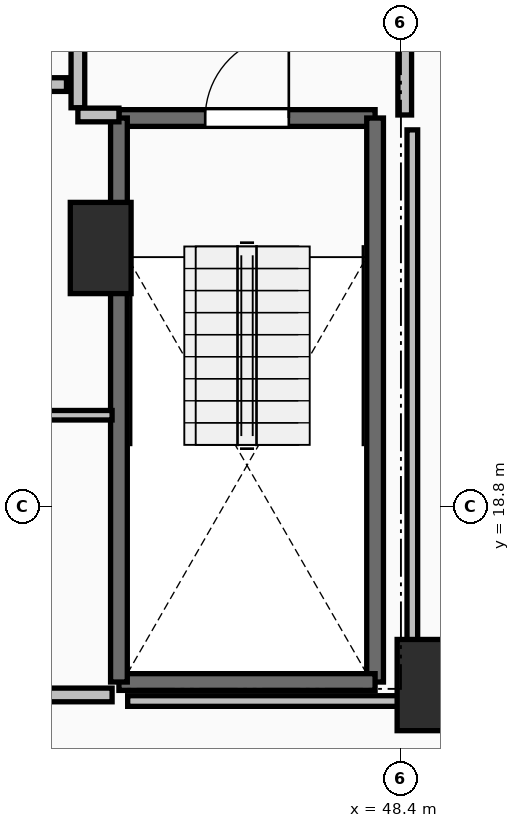
"""IFC4 building model, lengths in metres.
Left out: names, types, materials, properties, quantities, classifications, styles, units other than length and angle.
Written with IfcOpenShell. Run it as: python <this file> out.ifc"""

import sys

from ifc_helpers import new_model, si_unit, direction, frame, frame_2d, origin, origin_2d, place, context, subcontext, project, spatial, rectangle, extrude, element, fill, save


model = new_model("IFC4")
c1 = context("Model", 3, precision=1e-05, world=origin(), true_north=direction((0.0, 1.0)))
c2 = subcontext(c1, "Body", "Model", "MODEL_VIEW")
j1 = project(units=[si_unit("LENGTHUNIT", "METRE"), si_unit("PLANEANGLEUNIT", "RADIAN")], contexts=[c1])
p1 = place(None, origin())
s1 = spatial("IfcSite", under=j1, at=p1, CompositionType="ELEMENT")
p2 = place(p1, origin())
s2 = spatial("IfcBuilding", under=s1, at=p2, CompositionType="ELEMENT")
p3 = place(p2, frame((0.0, 0.0, 82.3)))
s3 = spatial("IfcBuildingStorey", under=s2, at=p3, CompositionType="ELEMENT", Elevation=82.3)
for number, where, z_axis, x_axis in (
    (1, (48.75, 16.45, 0.0), (0.0, 0.0, 1.0), (1.0, 0.0, 0.0)),
    (2, (44.45, 22.2, 0.0), (0.0, 0.0, 1.0), (1.0, 0.0, 0.0)),
):
    element("IfcColumn", number, at=place(p3, frame(where, z_axis=z_axis, x_axis=x_axis)), inside=s3, PredefinedType="PILASTER", context=c2, shape_type="SweptSolid", body=[
        extrude(rectangle(XDim=0.8, YDim=1.2, at=origin_2d()), origin(), (0.0, 0.0, 1.0), 3.5),
    ])
p4 = place(p3, frame((44.69, 23.91, 0.0), z_axis=(0.0, 0.0, 1.0), x_axis=(1.0, 0.0, 0.0)))
e3 = element("IfcWall", 3, at=p4, inside=s3, PredefinedType="SOLIDWALL", context=c2, shape_type="SweptSolid", body=[
    extrude(rectangle(XDim=3.37, YDim=0.22, at=frame_2d((1.685, 0.0))), origin(), (0.0, 0.0, 1.0), 3.24),
])
p5 = place(p4, frame((1.135, 0.0, 0.0)))
e4 = element("IfcOpeningElement", 4, at=p5, cuts=e3, PredefinedType="OPENING", context=c2, shape_type="SweptSolid", body=[
    extrude(rectangle(XDim=1.1, YDim=2.15, at=frame_2d((0.55, 1.075))), frame((0.0, 0.125, 0.0), z_axis=(0.0, -1.0, 0.0), x_axis=(1.0, 0.0, 0.0)), (0.0, 0.0, 1.0), 0.25),
])
p6 = place(p3, frame((48.06, 23.91, 0.0), z_axis=(0.0, 0.0, 1.0), x_axis=(0.0, -1.0, 0.0)))
e5 = element("IfcWall", 5, at=p6, inside=s3, PredefinedType="SOLIDWALL", context=c2, shape_type="SweptSolid", body=[
    extrude(rectangle(XDim=7.42, YDim=0.22, at=frame_2d((3.71, 0.0))), origin(), (0.0, 0.0, 1.0), 3.24),
])
p7 = place(p3, frame((48.06, 16.49, 0.0), z_axis=(0.0, 0.0, 1.0), x_axis=(-1.0, 0.0, 0.0)))
e6 = element("IfcWall", 6, at=p7, inside=s3, PredefinedType="SOLIDWALL", context=c2, shape_type="SweptSolid", body=[
    extrude(rectangle(XDim=3.37, YDim=0.22, at=frame_2d((1.685, 0.0))), origin(), (0.0, 0.0, 1.0), 3.24),
])
p8 = place(p3, frame((44.69, 16.49, 0.0), z_axis=(0.0, 0.0, 1.0), x_axis=(0.0, 1.0, 0.0)))
e7 = element("IfcWall", 7, at=p8, inside=s3, PredefinedType="SOLIDWALL", context=c2, shape_type="SweptSolid", body=[
    extrude(rectangle(XDim=7.42, YDim=0.22, at=frame_2d((3.71, 0.0))), origin(), (0.0, 0.0, 1.0), 3.24),
])
p9 = place(p3, frame((44.15, 27.955, 0.0), z_axis=(0.0, 0.0, 1.0), x_axis=(0.0, -1.0, 0.0)))
e8 = element("IfcWall", 8, at=p9, inside=s3, PredefinedType="PARTITIONING", context=c2, shape_type="SweptSolid", body=[
    extrude(rectangle(XDim=3.91, YDim=0.18, at=frame_2d((1.955, 0.0))), origin(), (0.0, 0.0, 1.0), 3.24),
])
p10 = place(p9, frame((1.355, 0.0, 0.0)))
e9 = element("IfcOpeningElement", 9, at=p10, cuts=e8, PredefinedType="OPENING", context=c2, shape_type="SweptSolid", body=[
    extrude(rectangle(XDim=1.2, YDim=2.15, at=frame_2d((0.6, 1.075))), frame((0.0, 0.105, 0.0), z_axis=(0.0, -1.0, 0.0), x_axis=(1.0, 0.0, 0.0)), (0.0, 0.0, 1.0), 0.21),
])
p11 = place(p3, frame((44.15, 23.95, 0.0), z_axis=(0.0, 0.0, 1.0), x_axis=(1.0, 0.0, 0.0)))
e10 = element("IfcWall", 10, at=p11, inside=s3, PredefinedType="PARTITIONING", context=c2, shape_type="SweptSolid", body=[
    extrude(rectangle(XDim=0.54, YDim=0.18, at=frame_2d((0.27, 0.0))), origin(), (0.0, 0.0, 1.0), 3.24),
])
p12 = place(p3, frame((48.45, 23.95, 0.0), z_axis=(0.0, 0.0, 1.0), x_axis=(0.0, 1.0, 0.0)))
e11 = element("IfcWall", 11, at=p12, inside=s3, PredefinedType="PARTITIONING", context=c2, shape_type="SweptSolid", body=[
    extrude(rectangle(XDim=4.05, YDim=0.18, at=frame_2d((2.025, 0.0))), origin(), (0.0, 0.0, 1.0), 3.24),
])
p13 = place(p12, frame((1.425, 0.0, 0.0)))
e12 = element("IfcOpeningElement", 12, at=p13, cuts=e11, PredefinedType="OPENING", context=c2, shape_type="SweptSolid", body=[
    extrude(rectangle(XDim=1.2, YDim=2.15, at=frame_2d((0.6, 1.075))), frame((0.0, 0.105, 0.0), z_axis=(0.0, -1.0, 0.0), x_axis=(1.0, 0.0, 0.0)), (0.0, 0.0, 1.0), 0.21),
])
p14 = place(p3, frame((41.555, 24.35, 0.0), z_axis=(0.0, 0.0, 1.0), x_axis=(1.0, 0.0, 0.0)))
e13 = element("IfcWall", 13, at=p14, inside=s3, PredefinedType="PARTITIONING", context=c2, shape_type="SweptSolid", body=[
    extrude(rectangle(XDim=2.445, YDim=0.18, at=frame_2d((1.223, 0.0))), origin(), (0.0, 0.0, 1.0), 3.24),
])
p15 = place(p14, frame((0.798, 0.0, 0.0)))
e14 = element("IfcOpeningElement", 14, at=p15, cuts=e13, PredefinedType="OPENING", context=c2, shape_type="SweptSolid", body=[
    extrude(rectangle(XDim=0.85, YDim=2.1, at=frame_2d((0.425, 1.05))), frame((0.0, 0.105, 0.0), z_axis=(0.0, -1.0, 0.0), x_axis=(1.0, 0.0, 0.0)), (0.0, 0.0, 1.0), 0.21),
])
p16 = place(p3, frame((44.6, 20.0, 0.0), z_axis=(0.0, 0.0, 1.0), x_axis=(-1.0, 0.0, 0.0)))
e15 = element("IfcWall", 15, at=p16, inside=s3, PredefinedType="PARTITIONING", context=c2, shape_type="SweptSolid", body=[
    extrude(rectangle(XDim=3.2, YDim=0.125, at=frame_2d((1.6, 0.0))), origin(), (0.0, 0.0, 1.0), 3.24),
])
p17 = place(p3, frame((41.4, 16.32, 0.0), z_axis=(0.0, 0.0, 1.0), x_axis=(1.0, 0.0, 0.0)))
e16 = element("IfcWall", 16, at=p17, inside=s3, PredefinedType="PARTITIONING", context=c2, shape_type="SweptSolid", body=[
    extrude(rectangle(XDim=3.2, YDim=0.18, at=frame_2d((1.6, 0.0))), origin(), (0.0, 0.0, 1.0), 3.24),
])
p18 = place(p17, frame((1.2, 0.0, 0.0)))
e17 = element("IfcOpeningElement", 17, at=p18, cuts=e16, PredefinedType="OPENING", context=c2, shape_type="SweptSolid", body=[
    extrude(rectangle(XDim=0.8, YDim=2.05, at=frame_2d((0.4, 1.025))), frame((0.0, 0.105, 0.0), z_axis=(0.0, -1.0, 0.0), x_axis=(1.0, 0.0, 0.0)), (0.0, 0.0, 1.0), 0.21),
])
p19 = place(p3, frame((48.55, 23.754, 0.0), z_axis=(0.0, 0.0, 1.0), x_axis=(0.0, -1.0, 0.0)))
e18 = element("IfcWall", 18, at=p19, inside=s3, PredefinedType="PARTITIONING", context=c2, shape_type="SweptSolid", body=[
    extrude(rectangle(XDim=7.514, YDim=0.14, at=frame_2d((3.757, 0.0))), origin(), (0.0, 0.0, 1.0), 2.432),
])
p20 = place(p3, frame((48.55, 16.24, 0.0), z_axis=(0.0, 0.0, 1.0), x_axis=(-1.0, 0.0, 0.0)))
e19 = element("IfcWall", 19, at=p20, inside=s3, PredefinedType="PARTITIONING", context=c2, shape_type="SweptSolid", body=[
    extrude(rectangle(XDim=3.745, YDim=0.14, at=frame_2d((1.873, 0.0))), origin(), (0.0, 0.0, 1.0), 2.432),
])
p21 = place(p5, origin())
e20 = element("IfcDoor", 20, at=p21, inside=s3, OperationType="SINGLE_SWING_RIGHT", PredefinedType="DOOR", context=c2, shape_type="SweptSolid", body=[
    extrude(rectangle(XDim=1.1, YDim=2.15, at=frame_2d((0.55, 1.075))), frame((0.0, 0.025, 0.0), z_axis=(0.0, -1.0, 0.0), x_axis=(1.0, 0.0, 0.0)), (0.0, 0.0, 1.0), 0.05),
])
fill(e4, e20)
save(model, sys.argv[1])
